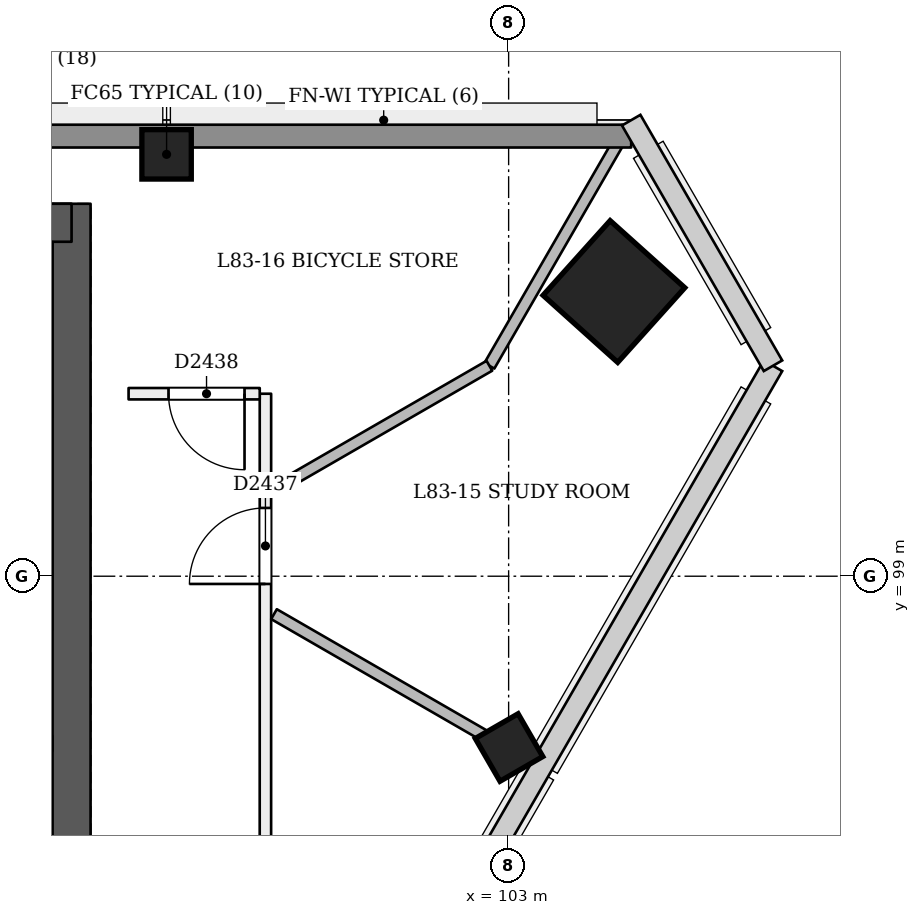
"""IFC4 building model, lengths in metres.
Left out: names, types, materials, properties, quantities, classifications, styles, units other than length and angle.
Written with IfcOpenShell. Run it as: python <this file> out.ifc"""

import sys

from ifc_helpers import new_model, si_unit, direction, frame, frame_2d, origin, origin_2d, place, context, subcontext, project, spatial, rectangle, extrude, element, fill, save


model = new_model("IFC4")
c1 = context("Model", 3, precision=1e-05, world=origin(), true_north=direction((0.0, 1.0)))
c2 = subcontext(c1, "Body", "Model", "MODEL_VIEW")
j1 = project(units=[si_unit("LENGTHUNIT", "METRE"), si_unit("PLANEANGLEUNIT", "RADIAN")], contexts=[c1])
p1 = place(None, origin())
s1 = spatial("IfcSite", under=j1, at=p1, CompositionType="ELEMENT")
p2 = place(p1, origin())
s2 = spatial("IfcBuilding", under=s1, at=p2, CompositionType="ELEMENT")
p3 = place(p2, frame((0.0, 0.0, 320.2)))
s3 = spatial("IfcBuildingStorey", under=s2, at=p3, CompositionType="ELEMENT", Elevation=320.2)
p4 = place(p3, frame((97.25, 93.15, 0.0), z_axis=(0.0, 0.0, 1.0), x_axis=(0.0, 1.0, 0.0)))
e1 = element("IfcWall", 1, at=p4, inside=s3, PredefinedType="SHEAR", context=c2, shape_type="SweptSolid", body=[
    extrude(rectangle(XDim=10.75, YDim=0.5, at=frame_2d((5.375, 0.0))), origin(), (0.0, 0.0, 1.0), 3.6),
])
p5 = place(p3, frame((97.25, 103.65, 0.0), z_axis=(0.0, 0.0, 1.0), x_axis=(-1.0, 0.0, 0.0)))
e2 = element("IfcWall", 2, at=p5, inside=s3, PredefinedType="SHEAR", context=c2, shape_type="SweptSolid", body=[
    extrude(rectangle(XDim=24.75, YDim=0.5, at=frame_2d((12.375, 0.0))), origin(), (0.0, 0.0, 1.0), 3.6),
])
p6 = place(p3, frame((104.419, 102.734, 0.0), z_axis=(-0.028401814599, 0.009218727412, 0.999554076572), x_axis=(0.500757440285, -0.865302682537, 0.02220931319)))
e3 = element("IfcColumn", 3, at=p6, inside=s3, PredefinedType="COLUMN", context=c2, shape_type="SweptSolid", body=[
    extrude(rectangle(XDim=1.32, YDim=1.32, at=origin_2d()), origin(), (0.0, 0.0, 1.0), 3.602),
])
p7 = place(p3, frame((98.5, 104.55, 0.0), z_axis=(0.0, 0.0, 1.0), x_axis=(1.0, 0.0, 0.0)))
e4 = element("IfcColumn", 4, at=p7, inside=s3, PredefinedType="COLUMN", context=c2, shape_type="SweptSolid", body=[
    extrude(rectangle(XDim=0.65, YDim=0.65, at=origin_2d()), origin(), (0.0, 0.0, 1.0), 3.6),
])
p8 = place(p3, frame((103.032, 96.699, -0.02), z_axis=(-0.02215369191, 0.038413282303, 0.999016333038), x_axis=(-0.500657441706, -0.865361507387, 0.022171774803)))
e5 = element("IfcColumn", 5, at=p8, inside=s3, PredefinedType="COLUMN", context=c2, shape_type="SweptSolid", body=[
    extrude(rectangle(XDim=0.65, YDim=0.65, at=origin_2d()), origin(), (0.0, 0.0, 1.0), 3.604),
])
p9 = place(p3, frame((99.8, 92.019, 0.0), z_axis=(0.0, 0.0, 1.0), x_axis=(5.2046738e-05, 0.999999998646, 0.0)))
e6 = element("IfcWall", 6, at=p9, inside=s3, PredefinedType="PARTITIONING", context=c2, shape_type="SweptSolid", body=[
    extrude(rectangle(XDim=9.382, YDim=0.15, at=frame_2d((4.691, 0.0))), origin(), (0.0, 0.0, 1.0), 3.2),
])
p10 = place(p9, frame((6.879, 0.0, 0.0)))
e7 = element("IfcOpeningElement", 7, at=p10, cuts=e6, PredefinedType="OPENING", context=c2, shape_type="SweptSolid", body=[
    extrude(rectangle(XDim=1.0, YDim=2.1, at=frame_2d((0.5, 1.05))), frame((0.0, 0.085, 0.0), z_axis=(0.0, -1.0, 0.0), x_axis=(1.0, 0.0, 0.0)), (0.0, 0.0, 1.0), 0.171),
])
p11 = place(p3, frame((99.726, 101.401, 0.0), z_axis=(0.0, 0.0, 1.0), x_axis=(-1.0, 0.0, 0.0)))
e8 = element("IfcWall", 8, at=p11, inside=s3, PredefinedType="PARTITIONING", context=c2, shape_type="SweptSolid", body=[
    extrude(rectangle(XDim=1.726, YDim=0.15, at=frame_2d((0.863, 0.0))), origin(), (0.0, 0.0, 1.0), 3.2),
])
p12 = place(p11, frame((0.2, 0.0, 0.0)))
e9 = element("IfcOpeningElement", 9, at=p12, cuts=e8, PredefinedType="OPENING", context=c2, shape_type="SweptSolid", body=[
    extrude(rectangle(XDim=1.0, YDim=2.1, at=frame_2d((0.5, 1.05))), frame((0.0, 0.085, 0.0), z_axis=(0.0, -1.0, 0.0), x_axis=(1.0, 0.0, 0.0)), (0.0, 0.0, 1.0), 0.171),
])
p13 = place(p3, frame((103.335, 96.525, 0.0), z_axis=(0.0, 0.0, 1.0), x_axis=(-0.866033324105, 0.499986281351, 0.0)))
e10 = element("IfcWall", 10, at=p13, inside=s3, PredefinedType="PARTITIONING", context=c2, shape_type="SweptSolid", body=[
    extrude(rectangle(XDim=3.952, YDim=0.15, at=frame_2d((1.976, 0.0))), origin(), (0.0, 0.0, 1.0), 2.7),
])
p14 = place(p3, frame((104.555, 104.9, 0.0), z_axis=(0.0, 0.0, 1.0), x_axis=(-0.499995211755, -0.866028168261, 0.0)))
e11 = element("IfcWall", 11, at=p14, inside=s3, PredefinedType="PARTITIONING", context=c2, shape_type="SweptSolid", body=[
    extrude(rectangle(XDim=3.616, YDim=0.15, at=frame_2d((1.808, 0.0))), origin(), (0.0, 0.0, 1.0), 2.7),
])
p15 = place(p3, frame((102.747, 101.769, 0.0), z_axis=(0.0, 0.0, 1.0), x_axis=(-0.866035243948, -0.499982955949, 0.0)))
e12 = element("IfcWall", 12, at=p15, inside=s3, PredefinedType="PARTITIONING", context=c2, shape_type="SweptSolid", body=[
    extrude(rectangle(XDim=3.272, YDim=0.15, at=frame_2d((1.636, 0.0))), origin(), (0.0, 0.0, 1.0), 3.2),
])
p16 = place(p3, frame((65.387, 104.79, 0.0), z_axis=(0.0, 0.0, 1.0), x_axis=(1.0, 0.0, 0.0)))
e13 = element("IfcWall", 13, at=p16, inside=s3, PredefinedType="SOLIDWALL", context=c2, shape_type="SweptSolid", body=[
    extrude(rectangle(XDim=39.225, YDim=0.3, at=frame_2d((19.613, 0.0))), origin(), (0.0, 0.0, 1.0), 2.7),
])
p17 = place(p10, origin())
e14 = element("IfcDoor", 14, at=p17, inside=s3, OperationType="SINGLE_SWING_LEFT", PredefinedType="NOTDEFINED", context=c2, shape_type="SweptSolid", body=[
    extrude(rectangle(XDim=1.0, YDim=2.1, at=frame_2d((0.5, 1.05))), frame((0.0, 0.025, 0.0), z_axis=(0.0, -1.0, 0.0), x_axis=(1.0, 0.0, 0.0)), (0.0, 0.0, 1.0), 0.05),
])
fill(e7, e14)
p18 = place(p12, origin())
e15 = element("IfcDoor", 15, at=p18, inside=s3, OperationType="SINGLE_SWING_LEFT", PredefinedType="NOTDEFINED", context=c2, shape_type="SweptSolid", body=[
    extrude(rectangle(XDim=1.0, YDim=2.1, at=frame_2d((0.5, 1.05))), frame((0.0, 0.025, 0.0), z_axis=(0.0, -1.0, 0.0), x_axis=(1.0, 0.0, 0.0)), (0.0, 0.0, 1.0), 0.05),
])
fill(e9, e15)
save(model, sys.argv[1])
